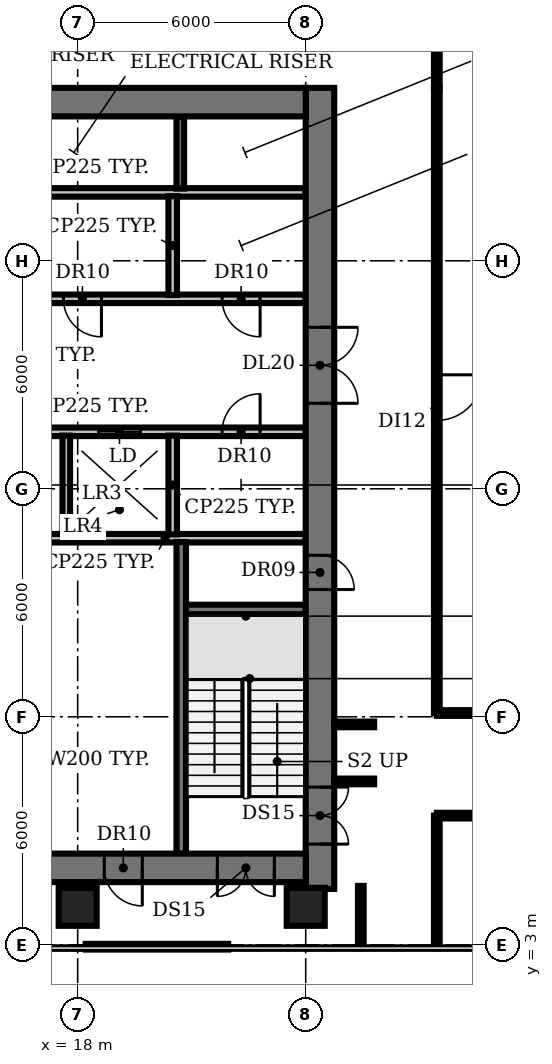
"""IFC4 building model, lengths in metres.
Left out: names, types, materials, properties, quantities, classifications, styles, units other than length and angle.
Written with IfcOpenShell. Run it as: python <this file> out.ifc"""

import sys

from ifc_helpers import new_model, si_unit, direction, frame, frame_2d, origin, origin_2d, place, context, subcontext, project, spatial, rectangle, extrude, element, fill, save


model = new_model("IFC4")
c1 = context("Model", 3, precision=1e-05, world=origin(), true_north=direction((0.0, 1.0)))
c2 = subcontext(c1, "Body", "Model", "MODEL_VIEW")
j1 = project(units=[si_unit("LENGTHUNIT", "METRE"), si_unit("PLANEANGLEUNIT", "RADIAN")], contexts=[c1])
p1 = place(None, origin())
s1 = spatial("IfcSite", under=j1, at=p1, CompositionType="ELEMENT")
p2 = place(p1, origin())
s2 = spatial("IfcBuilding", under=s1, at=p2, CompositionType="ELEMENT")
p3 = place(p2, frame((0.0, 0.0, 87.8)))
s3 = spatial("IfcBuildingStorey", under=s2, at=p3, CompositionType="ELEMENT", Elevation=87.8)
for number, where, z_axis, x_axis in (
    (1, (18.0, 4.0, -0.35), (0.0, 0.0, 1.0), (1.0, 0.0, 0.0)),
    (2, (24.0, 4.0, -0.35), (0.0, 0.0, 1.0), (1.0, 0.0, 0.0)),
):
    element("IfcColumn", number, at=place(p3, frame(where, z_axis=z_axis, x_axis=x_axis)), inside=s3, PredefinedType="COLUMN", context=c2, shape_type="SweptSolid", body=[
        extrude(rectangle(XDim=1.0, YDim=1.0, at=origin_2d()), origin(), (0.0, 0.0, 1.0), 4.2),
    ])
p4 = place(p3, frame((20.85, 11.825, 0.0), z_axis=(0.0, 0.0, 1.0), x_axis=(1.0, 0.0, 0.0)))
e3 = element("IfcWall", 3, at=p4, inside=s3, PredefinedType="SHEAR", context=c2, shape_type="SweptSolid", body=[
    extrude(rectangle(XDim=3.15, YDim=0.25, at=frame_2d((1.575, 0.0))), origin(), (0.0, 0.0, 1.0), 3.85),
])
p5 = place(p3, frame((16.6, 13.7, 0.0), z_axis=(0.0, 0.0, 1.0), x_axis=(1.0, 0.0, 0.0)))
e4 = element("IfcWall", 4, at=p5, inside=s3, PredefinedType="PARTITIONING", context=c2, shape_type="SweptSolid", body=[
    extrude(rectangle(XDim=7.4, YDim=0.225, at=frame_2d((3.7, 0.0))), origin(), (0.0, 0.0, 1.0), 3.85),
])
p6 = place(p3, frame((9.4, 16.5, 0.0), z_axis=(0.0, 0.0, 1.0), x_axis=(1.0, 0.0, 0.0)))
e5 = element("IfcWall", 5, at=p6, inside=s3, PredefinedType="PARTITIONING", context=c2, shape_type="SweptSolid", body=[
    extrude(rectangle(XDim=14.6, YDim=0.225, at=frame_2d((7.3, 0.0))), origin(), (0.0, 0.0, 1.0), 3.85),
])
p7 = place(p6, frame((0.75, 0.0, 0.0)))
e6 = element("IfcOpeningElement", 6, at=p7, cuts=e5, PredefinedType="OPENING", context=c2, shape_type="SweptSolid", body=[
    extrude(rectangle(XDim=1.1, YDim=2.1, at=frame_2d((0.55, 1.05))), frame((0.0, 0.123, 0.0), z_axis=(0.0, -1.0, 0.0), x_axis=(1.0, 0.0, 0.0)), (0.0, 0.0, 1.0), 0.245),
])
p8 = place(p6, frame((3.55, 0.0, 0.0)))
e7 = element("IfcOpeningElement", 7, at=p8, cuts=e5, PredefinedType="OPENING", context=c2, shape_type="SweptSolid", body=[
    extrude(rectangle(XDim=1.1, YDim=2.1, at=frame_2d((0.55, 1.05))), frame((0.0, 0.123, 0.0), z_axis=(0.0, -1.0, 0.0), x_axis=(1.0, 0.0, 0.0)), (0.0, 0.0, 1.0), 0.245),
])
p9 = place(p6, frame((6.35, 0.0, 0.0)))
e8 = element("IfcOpeningElement", 8, at=p9, cuts=e5, PredefinedType="OPENING", context=c2, shape_type="SweptSolid", body=[
    extrude(rectangle(XDim=1.1, YDim=2.1, at=frame_2d((0.55, 1.05))), frame((0.0, 0.123, 0.0), z_axis=(0.0, -1.0, 0.0), x_axis=(1.0, 0.0, 0.0)), (0.0, 0.0, 1.0), 0.245),
])
p10 = place(p6, frame((9.15, 0.0, 0.0)))
e9 = element("IfcOpeningElement", 9, at=p10, cuts=e5, PredefinedType="OPENING", context=c2, shape_type="SweptSolid", body=[
    extrude(rectangle(XDim=1.1, YDim=2.1, at=frame_2d((0.55, 1.05))), frame((0.0, 0.123, 0.0), z_axis=(0.0, -1.0, 0.0), x_axis=(1.0, 0.0, 0.0)), (0.0, 0.0, 1.0), 0.245),
])
p11 = place(p6, frame((12.4, 0.0, 0.0)))
e10 = element("IfcOpeningElement", 10, at=p11, cuts=e5, PredefinedType="OPENING", context=c2, shape_type="SweptSolid", body=[
    extrude(rectangle(XDim=1.0, YDim=2.1, at=frame_2d((0.5, 1.05))), frame((0.0, 0.123, 0.0), z_axis=(0.0, -1.0, 0.0), x_axis=(1.0, 0.0, 0.0)), (0.0, 0.0, 1.0), 0.245),
])
p12 = place(p3, frame((24.0, 20.0, 0.0), z_axis=(0.0, 0.0, 1.0), x_axis=(-1.0, 0.0, 0.0)))
e11 = element("IfcWall", 11, at=p12, inside=s3, PredefinedType="PARTITIONING", context=c2, shape_type="SweptSolid", body=[
    extrude(rectangle(XDim=14.6, YDim=0.225, at=frame_2d((7.3, 0.0))), origin(), (0.0, 0.0, 1.0), 3.85),
])
p13 = place(p12, frame((12.2, 0.0, 0.0)))
e12 = element("IfcOpeningElement", 12, at=p13, cuts=e11, PredefinedType="OPENING", context=c2, shape_type="SweptSolid", body=[
    extrude(rectangle(XDim=1.0, YDim=2.1, at=frame_2d((0.5, 1.05))), frame((0.0, 0.123, 0.0), z_axis=(0.0, -1.0, 0.0), x_axis=(1.0, 0.0, 0.0)), (0.0, 0.0, 1.0), 0.245),
])
p14 = place(p12, frame((9.025, 0.0, 0.0)))
e13 = element("IfcOpeningElement", 13, at=p14, cuts=e11, PredefinedType="OPENING", context=c2, shape_type="SweptSolid", body=[
    extrude(rectangle(XDim=0.9, YDim=2.1, at=frame_2d((0.45, 1.05))), frame((0.0, 0.123, 0.0), z_axis=(0.0, -1.0, 0.0), x_axis=(1.0, 0.0, 0.0)), (0.0, 0.0, 1.0), 0.245),
])
p15 = place(p12, frame((5.375, 0.0, 0.0)))
e14 = element("IfcOpeningElement", 14, at=p15, cuts=e11, PredefinedType="OPENING", context=c2, shape_type="SweptSolid", body=[
    extrude(rectangle(XDim=1.0, YDim=2.1, at=frame_2d((0.5, 1.05))), frame((0.0, 0.123, 0.0), z_axis=(0.0, -1.0, 0.0), x_axis=(1.0, 0.0, 0.0)), (0.0, 0.0, 1.0), 0.245),
])
p16 = place(p12, frame((1.2, 0.0, 0.0)))
e15 = element("IfcOpeningElement", 15, at=p16, cuts=e11, PredefinedType="OPENING", context=c2, shape_type="SweptSolid", body=[
    extrude(rectangle(XDim=1.0, YDim=2.1, at=frame_2d((0.5, 1.05))), frame((0.0, 0.123, 0.0), z_axis=(0.0, -1.0, 0.0), x_axis=(1.0, 0.0, 0.0)), (0.0, 0.0, 1.0), 0.245),
])
p17 = place(p3, frame((9.4, 22.8, 0.0), z_axis=(0.0, 0.0, 1.0), x_axis=(1.0, 0.0, 0.0)))
e16 = element("IfcWall", 16, at=p17, inside=s3, PredefinedType="PARTITIONING", context=c2, shape_type="SweptSolid", body=[
    extrude(rectangle(XDim=14.6, YDim=0.225, at=frame_2d((7.3, 0.0))), origin(), (0.0, 0.0, 1.0), 3.85),
])
p18 = place(p3, frame((17.7, 13.8, 0.0), z_axis=(0.0, 0.0, 1.0), x_axis=(0.0, 1.0, 0.0)))
e17 = element("IfcWall", 17, at=p18, inside=s3, PredefinedType="SOLIDWALL", context=c2, shape_type="SweptSolid", body=[
    extrude(rectangle(XDim=2.6, YDim=0.2, at=frame_2d((1.3, 0.0))), origin(), (0.0, 0.0, 1.0), 3.85),
])
for number, where, z_axis, x_axis in (
    (18, (20.5, 13.8, 0.0), (0.0, 0.0, 1.0), (0.0, 1.0, 0.0)),
    (19, (20.5, 20.1, 0.0), (0.0, 0.0, 1.0), (0.0, 1.0, 0.0)),
):
    element("IfcWall", number, at=place(p3, frame(where, z_axis=z_axis, x_axis=x_axis)), inside=s3, PredefinedType="PARTITIONING", context=c2, shape_type="SweptSolid", body=[
        extrude(rectangle(XDim=2.6, YDim=0.225, at=frame_2d((1.3, 0.0))), origin(), (0.0, 0.0, 1.0), 3.85),
    ])
p19 = place(p3, frame((20.7, 22.9, 0.0), z_axis=(0.0, 0.0, 1.0), x_axis=(0.0, 1.0, 0.0)))
e20 = element("IfcWall", 20, at=p19, inside=s3, PredefinedType="SHEAR", context=c2, shape_type="SweptSolid", body=[
    extrude(rectangle(XDim=1.9, YDim=0.2, at=frame_2d((0.95, 0.0))), origin(), (0.0, 0.0, 1.0), 3.85),
])
p20 = place(p3, frame((20.725, 5.4, 0.0), z_axis=(0.0, 0.0, 1.0), x_axis=(0.0, 1.0, 0.0)))
e21 = element("IfcWall", 21, at=p20, inside=s3, PredefinedType="SHEAR", context=c2, shape_type="SweptSolid", body=[
    extrude(rectangle(XDim=8.2, YDim=0.25, at=frame_2d((4.1, 0.0))), origin(), (0.0, 0.0, 1.0), 3.85),
])
p21 = place(p3, frame((24.375, 25.55, 0.0), z_axis=(0.0, 0.0, 1.0), x_axis=(0.0, -1.0, 0.0)))
e22 = element("IfcWall", 22, at=p21, inside=s3, PredefinedType="SHEAR", context=c2, shape_type="SweptSolid", body=[
    extrude(rectangle(XDim=21.08, YDim=0.75, at=frame_2d((10.54, 0.0))), origin(), (0.0, 0.0, 1.0), 3.85),
])
p22 = place(p21, frame((18.4, 0.0, 0.0)))
e23 = element("IfcOpeningElement", 23, at=p22, cuts=e22, PredefinedType="OPENING", context=c2, shape_type="SweptSolid", body=[
    extrude(rectangle(XDim=1.5, YDim=2.1, at=frame_2d((0.75, 1.05))), frame((0.0, 0.385, 0.0), z_axis=(0.0, -1.0, 0.0), x_axis=(1.0, 0.0, 0.0)), (0.0, 0.0, 1.0), 0.77),
])
p23 = place(p21, frame((12.3, 0.0, 0.0)))
e24 = element("IfcOpeningElement", 24, at=p23, cuts=e22, PredefinedType="OPENING", context=c2, shape_type="SweptSolid", body=[
    extrude(rectangle(XDim=0.9, YDim=2.1, at=frame_2d((0.45, 1.05))), frame((0.0, 0.385, 0.0), z_axis=(0.0, -1.0, 0.0), x_axis=(1.0, 0.0, 0.0)), (0.0, 0.0, 1.0), 0.77),
])
p24 = place(p21, frame((6.3, 0.0, 0.0)))
e25 = element("IfcOpeningElement", 25, at=p24, cuts=e22, PredefinedType="OPENING", context=c2, shape_type="SweptSolid", body=[
    extrude(rectangle(XDim=2.0, YDim=2.1, at=frame_2d((1.0, 1.05))), frame((0.0, 0.385, 0.0), z_axis=(0.0, -1.0, 0.0), x_axis=(1.0, 0.0, 0.0)), (0.0, 0.0, 1.0), 0.77),
])
p25 = place(p3, frame((24.0, 5.025, 0.0), z_axis=(0.0, 0.0, 1.0), x_axis=(-1.0, 0.0, 0.0)))
e26 = element("IfcWall", 26, at=p25, inside=s3, PredefinedType="SHEAR", context=c2, shape_type="SweptSolid", body=[
    extrude(rectangle(XDim=18.0, YDim=0.75, at=frame_2d((9.0, 0.0))), origin(), (0.0, 0.0, 1.0), 3.85),
])
p26 = place(p25, frame((0.825, 0.0, 0.0)))
e27 = element("IfcOpeningElement", 27, at=p26, cuts=e26, PredefinedType="OPENING", context=c2, shape_type="SweptSolid", body=[
    extrude(rectangle(XDim=1.5, YDim=2.1, at=frame_2d((0.75, 1.05))), frame((0.0, 0.385, 0.0), z_axis=(0.0, -1.0, 0.0), x_axis=(1.0, 0.0, 0.0)), (0.0, 0.0, 1.0), 0.77),
])
p27 = place(p25, frame((15.675, 0.0, 0.0)))
e28 = element("IfcOpeningElement", 28, at=p27, cuts=e26, PredefinedType="OPENING", context=c2, shape_type="SweptSolid", body=[
    extrude(rectangle(XDim=1.5, YDim=2.1, at=frame_2d((0.75, 1.05))), frame((0.0, 0.385, 0.0), z_axis=(0.0, -1.0, 0.0), x_axis=(1.0, 0.0, 0.0)), (0.0, 0.0, 1.0), 0.77),
])
p28 = place(p25, frame((13.0, 0.0, 0.0)))
e29 = element("IfcOpeningElement", 29, at=p28, cuts=e26, PredefinedType="OPENING", context=c2, shape_type="SweptSolid", body=[
    extrude(rectangle(XDim=1.2, YDim=2.1, at=frame_2d((0.6, 1.05))), frame((0.0, 0.385, 0.0), z_axis=(0.0, -1.0, 0.0), x_axis=(1.0, 0.0, 0.0)), (0.0, 0.0, 1.0), 0.77),
])
p29 = place(p25, frame((4.3, 0.0, 0.0)))
e30 = element("IfcOpeningElement", 30, at=p29, cuts=e26, PredefinedType="OPENING", context=c2, shape_type="SweptSolid", body=[
    extrude(rectangle(XDim=1.0, YDim=2.1, at=frame_2d((0.5, 1.05))), frame((0.0, 0.385, 0.0), z_axis=(0.0, -1.0, 0.0), x_axis=(1.0, 0.0, 0.0)), (0.0, 0.0, 1.0), 0.77),
])
p30 = place(p3, frame((6.0, 25.175, 0.0), z_axis=(0.0, 0.0, 1.0), x_axis=(1.0, 0.0, 0.0)))
e31 = element("IfcWall", 31, at=p30, inside=s3, PredefinedType="SHEAR", context=c2, shape_type="SweptSolid", body=[
    extrude(rectangle(XDim=18.0, YDim=0.75, at=frame_2d((9.0, 0.0))), origin(), (0.0, 0.0, 1.0), 3.85),
])
p31 = place(p3, frame((18.21, 2.95, 0.0), z_axis=(0.0, 0.0, 1.0), x_axis=(1.0, 0.0, 0.0)))
e32 = element("IfcWall", 32, at=p31, inside=s3, PredefinedType="PARTITIONING", context=c2, shape_type="SweptSolid", body=[
    extrude(rectangle(XDim=3.75, YDim=0.15, at=frame_2d((1.875, 0.0))), origin(), (0.0, 0.0, 1.0), 2.83),
])
for number, where, z_axis, x_axis in (
    (33, (24.75, 7.3, 0.0), (0.0, 0.0, 1.0), (1.0, 0.0, 0.0)),
    (34, (24.75, 8.8, 0.0), (0.0, 0.0, 1.0), (1.0, 0.0, 0.0)),
):
    element("IfcWall", number, at=place(p3, frame(where, z_axis=z_axis, x_axis=x_axis)), inside=s3, PredefinedType="PARTITIONING", context=c2, shape_type="SweptSolid", body=[
        extrude(rectangle(XDim=1.05, YDim=0.15, at=frame_2d((0.525, 0.0))), origin(), (0.0, 0.0, 1.0), 2.83),
    ])
p32 = place(p3, frame((25.45, 2.96, 0.0), z_axis=(0.0, 0.0, 1.0), x_axis=(0.0, 1.0, 0.0)))
e35 = element("IfcWall", 35, at=p32, inside=s3, PredefinedType="PARTITIONING", context=c2, shape_type="SweptSolid", body=[
    extrude(rectangle(XDim=1.59, YDim=0.15, at=frame_2d((0.795, 0.0))), origin(), (0.0, 0.0, 1.0), 2.83),
])
p33 = place(p3, frame((27.45, 2.96, 0.0), z_axis=(0.0, 0.0, 1.0), x_axis=(0.0, 1.0, 0.0)))
e36 = element("IfcWall", 36, at=p33, inside=s3, PredefinedType="PARTITIONING", context=c2, shape_type="SweptSolid", body=[
    extrude(rectangle(XDim=3.44, YDim=0.15, at=frame_2d((1.72, 0.0))), origin(), (0.0, 0.0, 1.0), 2.83),
])
p34 = place(p3, frame((27.45, 9.1, 0.0), z_axis=(0.0, 0.0, 1.0), x_axis=(1.0, 0.0, 0.0)))
e37 = element("IfcWall", 37, at=p34, inside=s3, PredefinedType="PARTITIONING", context=c2, shape_type="SweptSolid", body=[
    extrude(rectangle(XDim=8.55, YDim=0.15, at=frame_2d((4.275, 0.0))), origin(), (0.0, 0.0, 1.0), 2.83),
])
p35 = place(p3, frame((27.45, 25.55, 0.0), z_axis=(0.0, 0.0, 1.0), x_axis=(0.0, -1.0, 0.0)))
e38 = element("IfcWall", 38, at=p35, inside=s3, PredefinedType="PARTITIONING", context=c2, shape_type="SweptSolid", body=[
    extrude(rectangle(XDim=16.45, YDim=0.15, at=frame_2d((8.225, 0.0))), origin(), (0.0, 0.0, 1.0), 2.83),
])
p36 = place(p35, frame((7.55, 0.0, 0.0)))
e39 = element("IfcOpeningElement", 39, at=p36, cuts=e38, PredefinedType="OPENING", context=c2, shape_type="SweptSolid", body=[
    extrude(rectangle(XDim=1.2, YDim=2.1, at=frame_2d((0.6, 1.05))), frame((0.0, 0.085, 0.0), z_axis=(0.0, -1.0, 0.0), x_axis=(1.0, 0.0, 0.0)), (0.0, 0.0, 1.0), 0.17),
])
p37 = place(p3, frame((27.45, 25.55, 0.0), z_axis=(0.0, 0.0, 1.0), x_axis=(0.0, 1.0, 0.0)))
e40 = element("IfcWall", 40, at=p37, inside=s3, PredefinedType="PARTITIONING", context=c2, shape_type="SweptSolid", body=[
    extrude(rectangle(XDim=3.9, YDim=0.15, at=frame_2d((1.95, 0.0))), origin(), (0.0, 0.0, 1.0), 2.83),
])
p38 = place(p3, frame((51.851, 6.4, 0.0), z_axis=(0.0, 0.0, 1.0), x_axis=(-1.0, 0.0, 0.0)))
e41 = element("IfcWall", 41, at=p38, inside=s3, PredefinedType="PARTITIONING", context=c2, shape_type="SweptSolid", body=[
    extrude(rectangle(XDim=24.401, YDim=0.15, at=frame_2d((12.201, 0.0))), origin(), (0.0, 0.0, 1.0), 2.83),
])
p39 = place(p38, frame((11.601, 0.0, 0.0)))
e42 = element("IfcOpeningElement", 42, at=p39, cuts=e41, PredefinedType="OPENING", context=c2, shape_type="SweptSolid", body=[
    extrude(rectangle(XDim=1.2, YDim=2.1, at=frame_2d((0.6, 1.05))), frame((0.0, 0.085, 0.0), z_axis=(0.0, -1.0, 0.0), x_axis=(1.0, 0.0, 0.0)), (0.0, 0.0, 1.0), 0.17),
])
p40 = place(p10, origin())
e43 = element("IfcDoor", 43, at=p40, inside=s3, OperationType="DOUBLE_DOOR_SLIDING", PredefinedType="DOOR", context=c2, shape_type="SweptSolid", body=[
    extrude(rectangle(XDim=1.1, YDim=2.1, at=frame_2d((0.55, 1.05))), frame((0.0, 0.025, 0.0), z_axis=(0.0, -1.0, 0.0), x_axis=(1.0, 0.0, 0.0)), (0.0, 0.0, 1.0), 0.05),
])
fill(e9, e43)
p41 = place(p11, origin())
e44 = element("IfcDoor", 44, at=p41, inside=s3, OperationType="SINGLE_SWING_RIGHT", PredefinedType="DOOR", context=c2, shape_type="SweptSolid", body=[
    extrude(rectangle(XDim=1.0, YDim=2.1, at=frame_2d((0.5, 1.05))), frame((0.0, 0.025, 0.0), z_axis=(0.0, -1.0, 0.0), x_axis=(1.0, 0.0, 0.0)), (0.0, 0.0, 1.0), 0.05),
])
fill(e10, e44)
p42 = place(p15, origin())
e45 = element("IfcDoor", 45, at=p42, inside=s3, OperationType="SINGLE_SWING_LEFT", PredefinedType="DOOR", context=c2, shape_type="SweptSolid", body=[
    extrude(rectangle(XDim=1.0, YDim=2.1, at=frame_2d((0.5, 1.05))), frame((0.0, 0.025, 0.0), z_axis=(0.0, -1.0, 0.0), x_axis=(1.0, 0.0, 0.0)), (0.0, 0.0, 1.0), 0.05),
])
fill(e14, e45)
p43 = place(p16, origin())
e46 = element("IfcDoor", 46, at=p43, inside=s3, OperationType="SINGLE_SWING_LEFT", PredefinedType="DOOR", context=c2, shape_type="SweptSolid", body=[
    extrude(rectangle(XDim=1.0, YDim=2.1, at=frame_2d((0.5, 1.05))), frame((0.0, 0.025, 0.0), z_axis=(0.0, -1.0, 0.0), x_axis=(1.0, 0.0, 0.0)), (0.0, 0.0, 1.0), 0.05),
])
fill(e15, e46)
p44 = place(p22, origin())
e47 = element("IfcDoor", 47, at=p44, inside=s3, OperationType="DOUBLE_DOOR_SINGLE_SWING", PredefinedType="DOOR", context=c2, shape_type="SweptSolid", body=[
    extrude(rectangle(XDim=1.5, YDim=2.1, at=frame_2d((0.75, 1.05))), frame((0.0, 0.025, 0.0), z_axis=(0.0, -1.0, 0.0), x_axis=(1.0, 0.0, 0.0)), (0.0, 0.0, 1.0), 0.05),
])
fill(e23, e47)
p45 = place(p23, origin())
e48 = element("IfcDoor", 48, at=p45, inside=s3, OperationType="SINGLE_SWING_RIGHT", PredefinedType="DOOR", context=c2, shape_type="SweptSolid", body=[
    extrude(rectangle(XDim=0.9, YDim=2.1, at=frame_2d((0.45, 1.05))), frame((0.0, -0.315, 0.0), z_axis=(0.0, -1.0, 0.0), x_axis=(1.0, 0.0, 0.0)), (0.0, 0.0, 1.0), 0.05),
])
fill(e24, e48)
p46 = place(p24, origin())
e49 = element("IfcDoor", 49, at=p46, inside=s3, OperationType="DOUBLE_DOOR_SINGLE_SWING", PredefinedType="DOOR", context=c2, shape_type="SweptSolid", body=[
    extrude(rectangle(XDim=2.0, YDim=2.1, at=frame_2d((1.0, 1.05))), frame((0.0, 0.025, 0.0), z_axis=(0.0, -1.0, 0.0), x_axis=(1.0, 0.0, 0.0)), (0.0, 0.0, 1.0), 0.05),
])
fill(e25, e49)
p47 = place(p26, origin())
e50 = element("IfcDoor", 50, at=p47, inside=s3, OperationType="DOUBLE_DOOR_SINGLE_SWING", PredefinedType="DOOR", context=c2, shape_type="SweptSolid", body=[
    extrude(rectangle(XDim=1.5, YDim=2.1, at=frame_2d((0.75, 1.05))), frame((0.0, 0.025, 0.0), z_axis=(0.0, -1.0, 0.0), x_axis=(1.0, 0.0, 0.0)), (0.0, 0.0, 1.0), 0.05),
])
fill(e27, e50)
p48 = place(p29, origin())
e51 = element("IfcDoor", 51, at=p48, inside=s3, OperationType="SINGLE_SWING_LEFT", PredefinedType="DOOR", context=c2, shape_type="SweptSolid", body=[
    extrude(rectangle(XDim=1.0, YDim=2.1, at=frame_2d((0.5, 1.05))), frame((0.0, -0.315, 0.0), z_axis=(0.0, -1.0, 0.0), x_axis=(1.0, 0.0, 0.0)), (0.0, 0.0, 1.0), 0.05),
])
fill(e30, e51)
p49 = place(p36, origin())
e52 = element("IfcDoor", 52, at=p49, inside=s3, OperationType="SINGLE_SWING_LEFT", PredefinedType="DOOR", context=c2, shape_type="SweptSolid", body=[
    extrude(rectangle(XDim=1.2, YDim=2.1, at=frame_2d((0.6, 1.05))), frame((0.0, 0.025, 0.0), z_axis=(0.0, -1.0, 0.0), x_axis=(1.0, 0.0, 0.0)), (0.0, 0.0, 1.0), 0.05),
])
fill(e39, e52)
save(model, sys.argv[1])
